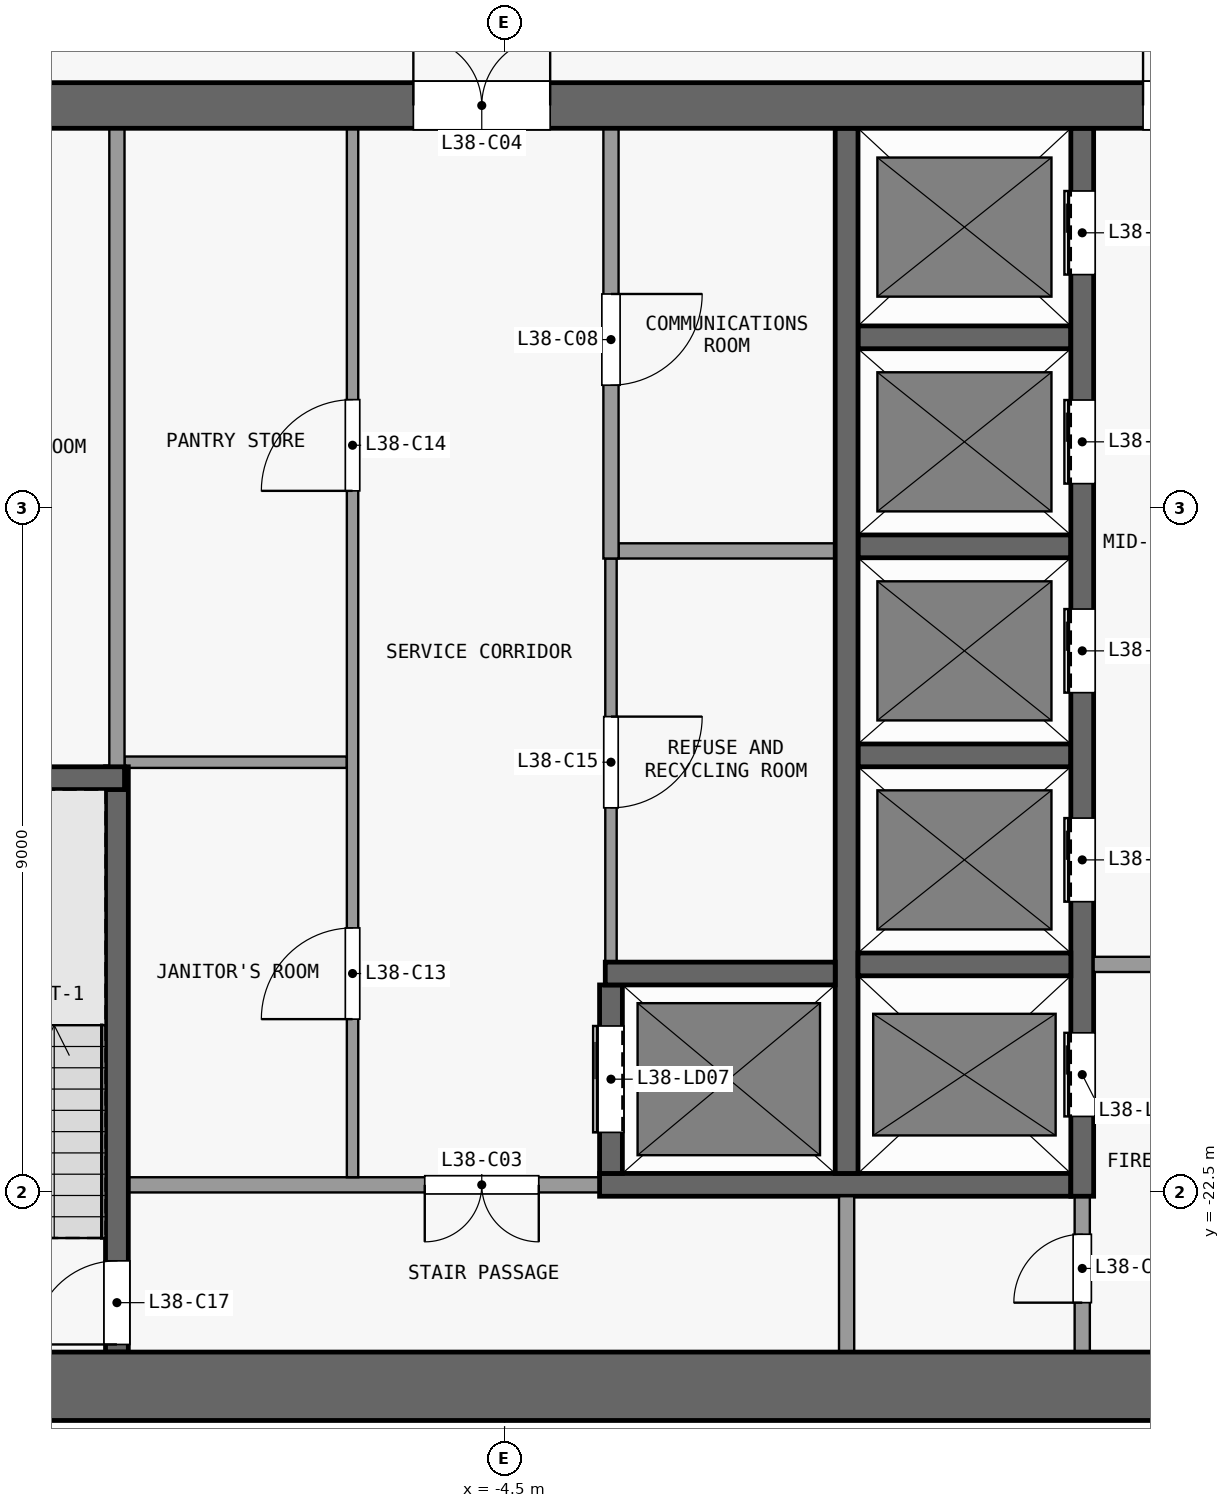
"""IFC4 building model, lengths in metres.
Left out: names, types, materials, properties, quantities, classifications, styles, units other than length and angle.
Written with IfcOpenShell. Run it as: python <this file> out.ifc"""

import sys

from ifc_helpers import new_model, si_unit, direction, frame, frame_2d, origin, place, context, subcontext, project, spatial, rectangle, extrude, element, fill, save


model = new_model("IFC4")
c1 = context("Model", 3, precision=1e-05, world=origin(), true_north=direction((0.0, 1.0)))
c2 = subcontext(c1, "Body", "Model", "MODEL_VIEW")
j1 = project(units=[si_unit("LENGTHUNIT", "METRE"), si_unit("PLANEANGLEUNIT", "RADIAN")], contexts=[c1])
p1 = place(None, origin())
s1 = spatial("IfcSite", under=j1, at=p1, CompositionType="ELEMENT")
p2 = place(p1, origin())
s2 = spatial("IfcBuilding", under=s1, at=p2, CompositionType="ELEMENT")
p3 = place(p2, frame((0.0, 0.0, 156.5)))
s3 = spatial("IfcBuildingStorey", under=s2, at=p3, CompositionType="ELEMENT", Elevation=156.5)
p4 = place(p3, frame((-13.3, -25.05, 0.0), z_axis=(0.0, 0.0, 1.0), x_axis=(1.0, 0.0, 0.0)))
e1 = element("IfcWall", 1, at=p4, inside=s3, PredefinedType="SHEAR", context=c2, shape_type="SweptSolid", body=[
    extrude(rectangle(XDim=26.6, YDim=0.9, at=frame_2d((13.3, 0.0))), origin(), (0.0, 0.0, 1.0), 3.3),
])
p5 = place(p3, frame((-13.3, -8.2, 0.0), z_axis=(0.0, 0.0, 1.0), x_axis=(1.0, 0.0, 0.0)))
e2 = element("IfcWall", 2, at=p5, inside=s3, PredefinedType="SHEAR", context=c2, shape_type="SweptSolid", body=[
    extrude(rectangle(XDim=26.6, YDim=0.6, at=frame_2d((13.3, 0.0))), origin(), (0.0, 0.0, 1.0), 3.3),
])
p6 = place(p5, frame((7.6, 0.0, 0.0)))
e3 = element("IfcOpeningElement", 3, at=p6, cuts=e2, PredefinedType="OPENING", context=c2, shape_type="SweptSolid", body=[
    extrude(rectangle(XDim=1.8, YDim=2.1, at=frame_2d((0.9, 1.05))), frame((0.0, 0.31, 0.0), z_axis=(0.0, -1.0, 0.0), x_axis=(1.0, 0.0, 0.0)), (0.0, 0.0, 1.0), 0.62),
])
p7 = place(p5, frame((17.2, 0.0, 0.0)))
e4 = element("IfcOpeningElement", 4, at=p7, cuts=e2, PredefinedType="OPENING", context=c2, shape_type="SweptSolid", body=[
    extrude(rectangle(XDim=1.8, YDim=2.1, at=frame_2d((0.9, 1.05))), frame((0.0, 0.31, 0.0), z_axis=(0.0, -1.0, 0.0), x_axis=(1.0, 0.0, 0.0)), (0.0, 0.0, 1.0), 0.62),
])
p8 = place(p5, frame((1.525, 0.0, 0.0)))
e5 = element("IfcOpeningElement", 5, at=p8, cuts=e2, PredefinedType="OPENING", context=c2, shape_type="SweptSolid", body=[
    extrude(rectangle(XDim=1.2, YDim=2.1, at=frame_2d((0.6, 1.05))), frame((0.0, 0.31, 0.0), z_axis=(0.0, -1.0, 0.0), x_axis=(1.0, 0.0, 0.0)), (0.0, 0.0, 1.0), 0.62),
])
p9 = place(p5, frame((23.175, 0.0, 0.0)))
e6 = element("IfcOpeningElement", 6, at=p9, cuts=e2, PredefinedType="OPENING", context=c2, shape_type="SweptSolid", body=[
    extrude(rectangle(XDim=0.9, YDim=2.1, at=frame_2d((0.45, 1.05))), frame((0.0, 0.31, 0.0), z_axis=(0.0, -1.0, 0.0), x_axis=(1.0, 0.0, 0.0)), (0.0, 0.0, 1.0), 0.62),
])
p10 = place(p3, frame((-3.25, -22.4, 0.0), z_axis=(0.0, 0.0, 1.0), x_axis=(-1.0, 0.0, 0.0)))
e7 = element("IfcWall", 7, at=p10, inside=s3, PredefinedType="PARTITIONING", context=c2, shape_type="SweptSolid", body=[
    extrude(rectangle(XDim=6.2, YDim=0.2, at=frame_2d((3.1, 0.0))), origin(), (0.0, 0.0, 1.0), 3.3),
])
p11 = place(p10, frame((0.8, 0.0, 0.0)))
e8 = element("IfcOpeningElement", 8, at=p11, cuts=e7, PredefinedType="OPENING", context=c2, shape_type="SweptSolid", body=[
    extrude(rectangle(XDim=1.5, YDim=2.1, at=frame_2d((0.75, 1.05))), frame((0.0, 0.11, 0.0), z_axis=(0.0, -1.0, 0.0), x_axis=(1.0, 0.0, 0.0)), (0.0, 0.0, 1.0), 0.22),
])
p12 = place(p3, frame((-3.25, -22.4, 0.0), z_axis=(0.0, 0.0, 1.0), x_axis=(1.0, 0.0, 0.0)))
e9 = element("IfcWall", 9, at=p12, inside=s3, PredefinedType="SHEAR", context=c2, shape_type="SweptSolid", body=[
    extrude(rectangle(XDim=6.2, YDim=0.3, at=frame_2d((3.1, 0.0))), origin(), (0.0, 0.0, 1.0), 3.3),
])
p13 = place(p3, frame((-3.175, -19.62, 0.0), z_axis=(0.0, 0.0, 1.0), x_axis=(1.0, 0.0, 0.0)))
e10 = element("IfcWall", 10, at=p13, inside=s3, PredefinedType="SHEAR", context=c2, shape_type="SweptSolid", body=[
    extrude(rectangle(XDim=3.025, YDim=0.3, at=frame_2d((1.513, 0.0))), origin(), (0.0, 0.0, 1.0), 3.3),
])
p14 = place(p3, frame((0.15, -19.5, 0.0), z_axis=(0.0, 0.0, 1.0), x_axis=(1.0, 0.0, 0.0)))
e11 = element("IfcWall", 11, at=p14, inside=s3, PredefinedType="SHEAR", context=c2, shape_type="SweptSolid", body=[
    extrude(rectangle(XDim=2.8, YDim=0.3, at=frame_2d((1.4, 0.0))), origin(), (0.0, 0.0, 1.0), 3.3),
])
p15 = place(p3, frame((6.575, -19.5, 0.0), z_axis=(0.0, 0.0, 1.0), x_axis=(-1.0, 0.0, 0.0)))
e12 = element("IfcWall", 12, at=p15, inside=s3, PredefinedType="PARTITIONING", context=c2, shape_type="SweptSolid", body=[
    extrude(rectangle(XDim=3.325, YDim=0.2, at=frame_2d((1.663, 0.0))), origin(), (0.0, 0.0, 1.0), 3.3),
])
p16 = place(p15, frame((1.025, 0.0, 0.0)))
e13 = element("IfcOpeningElement", 13, at=p16, cuts=e12, PredefinedType="OPENING", context=c2, shape_type="SweptSolid", body=[
    extrude(rectangle(XDim=1.5, YDim=2.1, at=frame_2d((0.75, 1.05))), frame((0.0, 0.11, 0.0), z_axis=(0.0, -1.0, 0.0), x_axis=(1.0, 0.0, 0.0)), (0.0, 0.0, 1.0), 0.22),
])
p17 = place(p3, frame((-12.6, -17.05, 0.0), z_axis=(0.0, 0.0, 1.0), x_axis=(1.0, 0.0, 0.0)))
e14 = element("IfcWall", 14, at=p17, inside=s3, PredefinedType="SHEAR", context=c2, shape_type="SweptSolid", body=[
    extrude(rectangle(XDim=3.1, YDim=0.3, at=frame_2d((1.55, 0.0))), origin(), (0.0, 0.0, 1.0), 3.3),
])
p18 = place(p3, frame((-9.5, -16.84, 0.0), z_axis=(0.0, 0.0, 1.0), x_axis=(1.0, 0.0, 0.0)))
e15 = element("IfcWall", 15, at=p18, inside=s3, PredefinedType="PARTITIONING", context=c2, shape_type="SweptSolid", body=[
    extrude(rectangle(XDim=2.925, YDim=0.15, at=frame_2d((1.462, 0.0))), origin(), (0.0, 0.0, 1.0), 3.3),
])
p19 = place(p3, frame((0.15, -16.75, 0.0), z_axis=(0.0, 0.0, 1.0), x_axis=(1.0, 0.0, 0.0)))
e16 = element("IfcWall", 16, at=p19, inside=s3, PredefinedType="SHEAR", context=c2, shape_type="SweptSolid", body=[
    extrude(rectangle(XDim=2.8, YDim=0.3, at=frame_2d((1.4, 0.0))), origin(), (0.0, 0.0, 1.0), 3.3),
])
p20 = place(p3, frame((-3.0, -14.06, 0.0), z_axis=(0.0, 0.0, 1.0), x_axis=(1.0, 0.0, 0.0)))
e17 = element("IfcWall", 17, at=p20, inside=s3, PredefinedType="PARTITIONING", context=c2, shape_type="SweptSolid", body=[
    extrude(rectangle(XDim=2.85, YDim=0.2, at=frame_2d((1.425, 0.0))), origin(), (0.0, 0.0, 1.0), 3.3),
])
for number, where, z_axis, x_axis in (
    (18, (0.15, -14.0, 0.0), (0.0, 0.0, 1.0), (1.0, 0.0, 0.0)),
    (19, (0.15, -11.25, 0.0), (0.0, 0.0, 1.0), (1.0, 0.0, 0.0)),
):
    element("IfcWall", number, at=place(p3, frame(where, z_axis=z_axis, x_axis=x_axis)), inside=s3, PredefinedType="SHEAR", context=c2, shape_type="SweptSolid", body=[
        extrude(rectangle(XDim=2.8, YDim=0.3, at=frame_2d((1.4, 0.0))), origin(), (0.0, 0.0, 1.0), 3.3),
    ])
p21 = place(p3, frame((-9.6, -24.6, 0.0), z_axis=(0.0, 0.0, 1.0), x_axis=(0.0, 1.0, 0.0)))
e20 = element("IfcWall", 20, at=p21, inside=s3, PredefinedType="SHEAR", context=c2, shape_type="SweptSolid", body=[
    extrude(rectangle(XDim=7.7, YDim=0.3, at=frame_2d((3.85, 0.0))), origin(), (0.0, 0.0, 1.0), 3.3),
])
p22 = place(p21, frame((0.1, 0.0, 0.0)))
e21 = element("IfcOpeningElement", 21, at=p22, cuts=e20, PredefinedType="OPENING", context=c2, shape_type="SweptSolid", body=[
    extrude(rectangle(XDim=1.1, YDim=2.1, at=frame_2d((0.55, 1.05))), frame((0.0, 0.16, 0.0), z_axis=(0.0, -1.0, 0.0), x_axis=(1.0, 0.0, 0.0)), (0.0, 0.0, 1.0), 0.32),
])
p23 = place(p3, frame((-9.6, -16.9, 0.0), z_axis=(0.0, 0.0, 1.0), x_axis=(0.0, 1.0, 0.0)))
e22 = element("IfcWall", 22, at=p23, inside=s3, PredefinedType="PARTITIONING", context=c2, shape_type="SweptSolid", body=[
    extrude(rectangle(XDim=8.4, YDim=0.2, at=frame_2d((4.2, 0.0))), origin(), (0.0, 0.0, 1.0), 3.3),
])
p24 = place(p3, frame((-6.5, -22.3, 0.0), z_axis=(0.0, 0.0, 1.0), x_axis=(0.0, 1.0, 0.0)))
e23 = element("IfcWall", 23, at=p24, inside=s3, PredefinedType="PARTITIONING", context=c2, shape_type="SweptSolid", body=[
    extrude(rectangle(XDim=13.8, YDim=0.15, at=frame_2d((6.9, 0.0))), origin(), (0.0, 0.0, 1.0), 3.3),
])
p25 = place(p24, frame((2.08, 0.0, 0.0)))
e24 = element("IfcOpeningElement", 24, at=p25, cuts=e23, PredefinedType="OPENING", context=c2, shape_type="SweptSolid", body=[
    extrude(rectangle(XDim=1.2, YDim=2.1, at=frame_2d((0.6, 1.05))), frame((0.0, 0.085, 0.0), z_axis=(0.0, -1.0, 0.0), x_axis=(1.0, 0.0, 0.0)), (0.0, 0.0, 1.0), 0.17),
])
p26 = place(p24, frame((9.03, 0.0, 0.0)))
e25 = element("IfcOpeningElement", 25, at=p26, cuts=e23, PredefinedType="OPENING", context=c2, shape_type="SweptSolid", body=[
    extrude(rectangle(XDim=1.2, YDim=2.1, at=frame_2d((0.6, 1.05))), frame((0.0, 0.085, 0.0), z_axis=(0.0, -1.0, 0.0), x_axis=(1.0, 0.0, 0.0)), (0.0, 0.0, 1.0), 0.17),
])
p27 = place(p3, frame((-3.1, -22.25, 0.0), z_axis=(0.0, 0.0, 1.0), x_axis=(0.0, 1.0, 0.0)))
e26 = element("IfcWall", 26, at=p27, inside=s3, PredefinedType="SHEAR", context=c2, shape_type="SweptSolid", body=[
    extrude(rectangle(XDim=2.48, YDim=0.3, at=frame_2d((1.24, 0.0))), origin(), (0.0, 0.0, 1.0), 3.3),
])
p28 = place(p27, frame((0.54, 0.0, 0.0)))
e27 = element("IfcOpeningElement", 27, at=p28, cuts=e26, PredefinedType="OPENING", context=c2, shape_type="SweptSolid", body=[
    extrude(rectangle(XDim=1.4, YDim=2.1, at=frame_2d((0.7, 1.05))), frame((0.0, 0.16, 0.0), z_axis=(0.0, -1.0, 0.0), x_axis=(1.0, 0.0, 0.0)), (0.0, 0.0, 1.0), 0.32),
])
p29 = place(p3, frame((-3.1, -14.16, 0.0), z_axis=(0.0, 0.0, 1.0), x_axis=(0.0, -1.0, 0.0)))
e28 = element("IfcWall", 28, at=p29, inside=s3, PredefinedType="PARTITIONING", context=c2, shape_type="SweptSolid", body=[
    extrude(rectangle(XDim=5.31, YDim=0.15, at=frame_2d((2.655, 0.0))), origin(), (0.0, 0.0, 1.0), 3.3),
])
p30 = place(p29, frame((2.08, 0.0, 0.0)))
e29 = element("IfcOpeningElement", 29, at=p30, cuts=e28, PredefinedType="OPENING", context=c2, shape_type="SweptSolid", body=[
    extrude(rectangle(XDim=1.2, YDim=2.1, at=frame_2d((0.6, 1.05))), frame((0.0, 0.085, 0.0), z_axis=(0.0, -1.0, 0.0), x_axis=(1.0, 0.0, 0.0)), (0.0, 0.0, 1.0), 0.17),
])
p31 = place(p3, frame((-3.1, -8.5, 0.0), z_axis=(0.0, 0.0, 1.0), x_axis=(0.0, -1.0, 0.0)))
e30 = element("IfcWall", 30, at=p31, inside=s3, PredefinedType="PARTITIONING", context=c2, shape_type="SweptSolid", body=[
    extrude(rectangle(XDim=5.66, YDim=0.2, at=frame_2d((2.83, 0.0))), origin(), (0.0, 0.0, 1.0), 3.3),
])
p32 = place(p31, frame((2.18, 0.0, 0.0)))
e31 = element("IfcOpeningElement", 31, at=p32, cuts=e30, PredefinedType="OPENING", context=c2, shape_type="SweptSolid", body=[
    extrude(rectangle(XDim=1.2, YDim=2.1, at=frame_2d((0.6, 1.05))), frame((0.0, 0.11, 0.0), z_axis=(0.0, -1.0, 0.0), x_axis=(1.0, 0.0, 0.0)), (0.0, 0.0, 1.0), 0.22),
])
p33 = place(p3, frame((0.0, -24.6, 0.0), z_axis=(0.0, 0.0, 1.0), x_axis=(0.0, 1.0, 0.0)))
e32 = element("IfcWall", 32, at=p33, inside=s3, PredefinedType="PARTITIONING", context=c2, shape_type="SweptSolid", body=[
    extrude(rectangle(XDim=2.05, YDim=0.2, at=frame_2d((1.025, 0.0))), origin(), (0.0, 0.0, 1.0), 3.3),
])
p34 = place(p3, frame((0.0, -22.25, 0.0), z_axis=(0.0, 0.0, 1.0), x_axis=(0.0, 1.0, 0.0)))
e33 = element("IfcWall", 33, at=p34, inside=s3, PredefinedType="SHEAR", context=c2, shape_type="SweptSolid", body=[
    extrude(rectangle(XDim=13.75, YDim=0.3, at=frame_2d((6.875, 0.0))), origin(), (0.0, 0.0, 1.0), 3.3),
])
p35 = place(p3, frame((3.1, -24.6, 0.0), z_axis=(0.0, 0.0, 1.0), x_axis=(0.0, 1.0, 0.0)))
e34 = element("IfcWall", 34, at=p35, inside=s3, PredefinedType="PARTITIONING", context=c2, shape_type="SweptSolid", body=[
    extrude(rectangle(XDim=2.05, YDim=0.2, at=frame_2d((1.025, 0.0))), origin(), (0.0, 0.0, 1.0), 3.3),
])
p36 = place(p35, frame((0.65, 0.0, 0.0)))
e35 = element("IfcOpeningElement", 35, at=p36, cuts=e34, PredefinedType="OPENING", context=c2, shape_type="SweptSolid", body=[
    extrude(rectangle(XDim=0.9, YDim=2.1, at=frame_2d((0.45, 1.05))), frame((0.0, 0.11, 0.0), z_axis=(0.0, -1.0, 0.0), x_axis=(1.0, 0.0, 0.0)), (0.0, 0.0, 1.0), 0.22),
])
p37 = place(p3, frame((3.1, -22.55, 0.0), z_axis=(0.0, 0.0, 1.0), x_axis=(0.0, 1.0, 0.0)))
e36 = element("IfcWall", 36, at=p37, inside=s3, PredefinedType="SHEAR", context=c2, shape_type="SweptSolid", body=[
    extrude(rectangle(XDim=14.05, YDim=0.3, at=frame_2d((7.025, 0.0))), origin(), (0.0, 0.0, 1.0), 3.3),
])
p38 = place(p37, frame((1.05, 0.0, 0.0)))
e37 = element("IfcOpeningElement", 37, at=p38, cuts=e36, PredefinedType="OPENING", context=c2, shape_type="SweptSolid", body=[
    extrude(rectangle(XDim=1.1, YDim=2.1, at=frame_2d((0.55, 1.05))), frame((0.0, 0.16, 0.0), z_axis=(0.0, -1.0, 0.0), x_axis=(1.0, 0.0, 0.0)), (0.0, 0.0, 1.0), 0.32),
])
p39 = place(p37, frame((3.875, 0.0, 0.0)))
e38 = element("IfcOpeningElement", 38, at=p39, cuts=e36, PredefinedType="OPENING", context=c2, shape_type="SweptSolid", body=[
    extrude(rectangle(XDim=1.1, YDim=2.1, at=frame_2d((0.55, 1.05))), frame((0.0, 0.16, 0.0), z_axis=(0.0, -1.0, 0.0), x_axis=(1.0, 0.0, 0.0)), (0.0, 0.0, 1.0), 0.32),
])
p40 = place(p37, frame((6.625, 0.0, 0.0)))
e39 = element("IfcOpeningElement", 39, at=p40, cuts=e36, PredefinedType="OPENING", context=c2, shape_type="SweptSolid", body=[
    extrude(rectangle(XDim=1.1, YDim=2.1, at=frame_2d((0.55, 1.05))), frame((0.0, 0.16, 0.0), z_axis=(0.0, -1.0, 0.0), x_axis=(1.0, 0.0, 0.0)), (0.0, 0.0, 1.0), 0.32),
])
p41 = place(p37, frame((9.375, 0.0, 0.0)))
e40 = element("IfcOpeningElement", 40, at=p41, cuts=e36, PredefinedType="OPENING", context=c2, shape_type="SweptSolid", body=[
    extrude(rectangle(XDim=1.1, YDim=2.1, at=frame_2d((0.55, 1.05))), frame((0.0, 0.16, 0.0), z_axis=(0.0, -1.0, 0.0), x_axis=(1.0, 0.0, 0.0)), (0.0, 0.0, 1.0), 0.32),
])
p42 = place(p37, frame((12.125, 0.0, 0.0)))
e41 = element("IfcOpeningElement", 41, at=p42, cuts=e36, PredefinedType="OPENING", context=c2, shape_type="SweptSolid", body=[
    extrude(rectangle(XDim=1.1, YDim=2.1, at=frame_2d((0.55, 1.05))), frame((0.0, 0.16, 0.0), z_axis=(0.0, -1.0, 0.0), x_axis=(1.0, 0.0, 0.0)), (0.0, 0.0, 1.0), 0.32),
])
p43 = place(p38, origin())
e42 = element("IfcDoor", 42, at=p43, inside=s3, OperationType="DOUBLE_DOOR_SLIDING", PredefinedType="DOOR", context=c2, shape_type="SweptSolid", body=[
    extrude(rectangle(XDim=1.1, YDim=2.1, at=frame_2d((0.55, 1.05))), frame((0.0, 0.025, 0.0), z_axis=(0.0, -1.0, 0.0), x_axis=(1.0, 0.0, 0.0)), (0.0, 0.0, 1.0), 0.05),
])
fill(e37, e42)
p44 = place(p39, origin())
e43 = element("IfcDoor", 43, at=p44, inside=s3, OperationType="DOUBLE_DOOR_SLIDING", PredefinedType="DOOR", context=c2, shape_type="SweptSolid", body=[
    extrude(rectangle(XDim=1.1, YDim=2.1, at=frame_2d((0.55, 1.05))), frame((0.0, 0.025, 0.0), z_axis=(0.0, -1.0, 0.0), x_axis=(1.0, 0.0, 0.0)), (0.0, 0.0, 1.0), 0.05),
])
fill(e38, e43)
p45 = place(p40, origin())
e44 = element("IfcDoor", 44, at=p45, inside=s3, OperationType="DOUBLE_DOOR_SLIDING", PredefinedType="DOOR", context=c2, shape_type="SweptSolid", body=[
    extrude(rectangle(XDim=1.1, YDim=2.1, at=frame_2d((0.55, 1.05))), frame((0.0, 0.025, 0.0), z_axis=(0.0, -1.0, 0.0), x_axis=(1.0, 0.0, 0.0)), (0.0, 0.0, 1.0), 0.05),
])
fill(e39, e44)
p46 = place(p41, origin())
e45 = element("IfcDoor", 45, at=p46, inside=s3, OperationType="DOUBLE_DOOR_SLIDING", PredefinedType="DOOR", context=c2, shape_type="SweptSolid", body=[
    extrude(rectangle(XDim=1.1, YDim=2.1, at=frame_2d((0.55, 1.05))), frame((0.0, 0.025, 0.0), z_axis=(0.0, -1.0, 0.0), x_axis=(1.0, 0.0, 0.0)), (0.0, 0.0, 1.0), 0.05),
])
fill(e40, e45)
p47 = place(p42, origin())
e46 = element("IfcDoor", 46, at=p47, inside=s3, OperationType="DOUBLE_DOOR_SLIDING", PredefinedType="DOOR", context=c2, shape_type="SweptSolid", body=[
    extrude(rectangle(XDim=1.1, YDim=2.1, at=frame_2d((0.55, 1.05))), frame((0.0, 0.025, 0.0), z_axis=(0.0, -1.0, 0.0), x_axis=(1.0, 0.0, 0.0)), (0.0, 0.0, 1.0), 0.05),
])
fill(e41, e46)
p48 = place(p28, origin())
e47 = element("IfcDoor", 47, at=p48, inside=s3, OperationType="DOUBLE_DOOR_SLIDING", PredefinedType="DOOR", context=c2, shape_type="SweptSolid", body=[
    extrude(rectangle(XDim=1.4, YDim=2.1, at=frame_2d((0.7, 1.05))), frame((0.0, 0.025, 0.0), z_axis=(0.0, -1.0, 0.0), x_axis=(1.0, 0.0, 0.0)), (0.0, 0.0, 1.0), 0.05),
])
fill(e27, e47)
p49 = place(p11, origin())
e48 = element("IfcDoor", 48, at=p49, inside=s3, OperationType="DOUBLE_DOOR_SINGLE_SWING", PredefinedType="DOOR", context=c2, shape_type="SweptSolid", body=[
    extrude(rectangle(XDim=1.5, YDim=2.1, at=frame_2d((0.75, 1.05))), frame((0.0, 0.025, 0.0), z_axis=(0.0, -1.0, 0.0), x_axis=(1.0, 0.0, 0.0)), (0.0, 0.0, 1.0), 0.05),
])
fill(e8, e48)
p50 = place(p6, origin())
e49 = element("IfcDoor", 49, at=p50, inside=s3, OperationType="DOUBLE_DOOR_SINGLE_SWING", PredefinedType="DOOR", context=c2, shape_type="SweptSolid", body=[
    extrude(rectangle(XDim=1.8, YDim=2.1, at=frame_2d((0.9, 1.05))), frame((0.0, 0.025, 0.0), z_axis=(0.0, -1.0, 0.0), x_axis=(1.0, 0.0, 0.0)), (0.0, 0.0, 1.0), 0.05),
])
fill(e3, e49)
p51 = place(p7, origin())
e50 = element("IfcDoor", 50, at=p51, inside=s3, OperationType="DOUBLE_DOOR_SINGLE_SWING", PredefinedType="DOOR", context=c2, shape_type="SweptSolid", body=[
    extrude(rectangle(XDim=1.8, YDim=2.1, at=frame_2d((0.9, 1.05))), frame((0.0, 0.025, 0.0), z_axis=(0.0, -1.0, 0.0), x_axis=(1.0, 0.0, 0.0)), (0.0, 0.0, 1.0), 0.05),
])
fill(e4, e50)
p52 = place(p36, origin())
e51 = element("IfcDoor", 51, at=p52, inside=s3, OperationType="SINGLE_SWING_LEFT", PredefinedType="DOOR", context=c2, shape_type="SweptSolid", body=[
    extrude(rectangle(XDim=0.9, YDim=2.1, at=frame_2d((0.45, 1.05))), frame((0.0, 0.025, 0.0), z_axis=(0.0, -1.0, 0.0), x_axis=(1.0, 0.0, 0.0)), (0.0, 0.0, 1.0), 0.05),
])
fill(e35, e51)
p53 = place(p32, origin())
e52 = element("IfcDoor", 52, at=p53, inside=s3, OperationType="SINGLE_SWING_LEFT", PredefinedType="DOOR", context=c2, shape_type="SweptSolid", body=[
    extrude(rectangle(XDim=1.2, YDim=2.1, at=frame_2d((0.6, 1.05))), frame((0.0, 0.025, 0.0), z_axis=(0.0, -1.0, 0.0), x_axis=(1.0, 0.0, 0.0)), (0.0, 0.0, 1.0), 0.05),
])
fill(e31, e52)
p54 = place(p25, origin())
e53 = element("IfcDoor", 53, at=p54, inside=s3, OperationType="SINGLE_SWING_LEFT", PredefinedType="DOOR", context=c2, shape_type="SweptSolid", body=[
    extrude(rectangle(XDim=1.2, YDim=2.1, at=frame_2d((0.6, 1.05))), frame((0.0, 0.025, 0.0), z_axis=(0.0, -1.0, 0.0), x_axis=(1.0, 0.0, 0.0)), (0.0, 0.0, 1.0), 0.05),
])
fill(e24, e53)
p55 = place(p26, origin())
e54 = element("IfcDoor", 54, at=p55, inside=s3, OperationType="SINGLE_SWING_LEFT", PredefinedType="DOOR", context=c2, shape_type="SweptSolid", body=[
    extrude(rectangle(XDim=1.2, YDim=2.1, at=frame_2d((0.6, 1.05))), frame((0.0, 0.025, 0.0), z_axis=(0.0, -1.0, 0.0), x_axis=(1.0, 0.0, 0.0)), (0.0, 0.0, 1.0), 0.05),
])
fill(e25, e54)
p56 = place(p30, origin())
e55 = element("IfcDoor", 55, at=p56, inside=s3, OperationType="SINGLE_SWING_LEFT", PredefinedType="DOOR", context=c2, shape_type="SweptSolid", body=[
    extrude(rectangle(XDim=1.2, YDim=2.1, at=frame_2d((0.6, 1.05))), frame((0.0, 0.025, 0.0), z_axis=(0.0, -1.0, 0.0), x_axis=(1.0, 0.0, 0.0)), (0.0, 0.0, 1.0), 0.05),
])
fill(e29, e55)
p57 = place(p22, origin())
e56 = element("IfcDoor", 56, at=p57, inside=s3, OperationType="SINGLE_SWING_LEFT", PredefinedType="DOOR", context=c2, shape_type="SweptSolid", body=[
    extrude(rectangle(XDim=1.1, YDim=2.1, at=frame_2d((0.55, 1.05))), frame((0.0, 0.025, 0.0), z_axis=(0.0, -1.0, 0.0), x_axis=(1.0, 0.0, 0.0)), (0.0, 0.0, 1.0), 0.05),
])
fill(e21, e56)
save(model, sys.argv[1])
